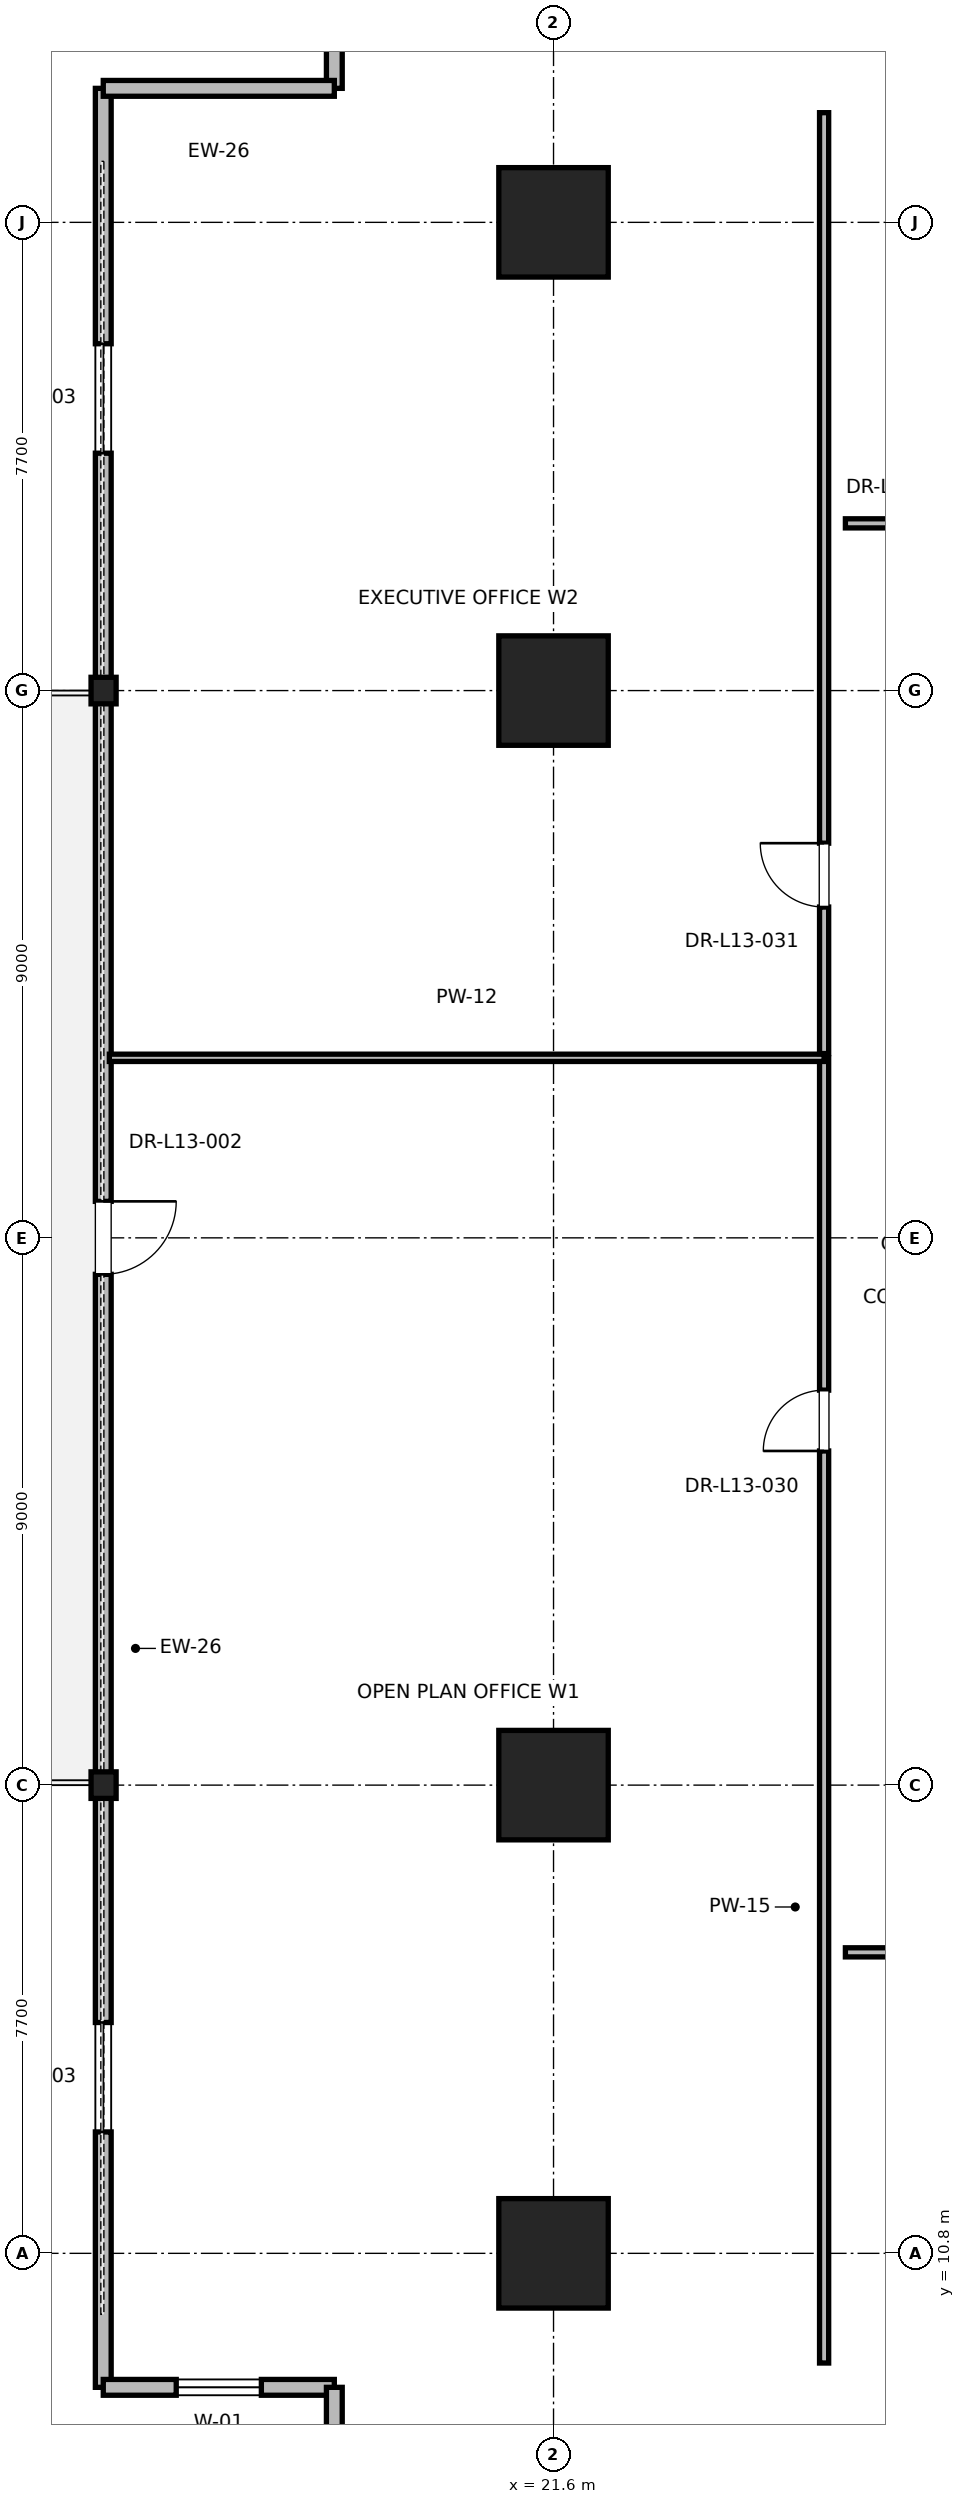
"""IFC4 building model, lengths in metres.
Left out: names, types, materials, properties, quantities, classifications, styles, units other than length and angle.
Written with IfcOpenShell. Run it as: python <this file> out.ifc"""

import sys

from ifc_helpers import new_model, si_unit, direction, frame, frame_2d, origin, origin_2d, place, context, subcontext, project, spatial, rectangle, i_section, extrude, element, fill, save


model = new_model("IFC4")
c1 = context("Model", 3, precision=1e-05, world=origin(), true_north=direction((0.0, 1.0)))
c2 = subcontext(c1, "Body", "Model", "MODEL_VIEW")
j1 = project(units=[si_unit("LENGTHUNIT", "METRE"), si_unit("PLANEANGLEUNIT", "RADIAN")], contexts=[c1])
p1 = place(None, origin())
s1 = spatial("IfcSite", under=j1, at=p1, CompositionType="ELEMENT")
p2 = place(p1, origin())
s2 = spatial("IfcBuilding", under=s1, at=p2, CompositionType="ELEMENT")
p3 = place(p2, frame((0.0, 0.0, 59.6)))
s3 = spatial("IfcBuildingStorey", under=s2, at=p3, CompositionType="ELEMENT", Elevation=59.6)
for number, where, z_axis, x_axis in (
    (1, (21.6, 18.5, 0.0), (0.0, 0.0, 1.0), (1.0, 0.0, 0.0)),
    (2, (21.6, 36.5, 0.0), (0.0, 0.0, 1.0), (1.0, 0.0, 0.0)),
    (3, (21.6, 10.8, 0.0), (0.0, 0.0, 1.0), (1.0, 0.0, 0.0)),
    (4, (21.6, 44.2, 0.0), (0.0, 0.0, 1.0), (1.0, 0.0, 0.0)),
):
    element("IfcColumn", number, at=place(p3, frame(where, z_axis=z_axis, x_axis=x_axis)), inside=s3, PredefinedType="COLUMN", context=c2, shape_type="SweptSolid", body=[
        extrude(rectangle(XDim=1.8, YDim=1.8, at=origin_2d()), origin(), (0.0, 0.0, 1.0), 4.0),
    ])
for number, where, z_axis, x_axis in (
    (5, (14.2, 18.5, 0.0), (0.0, 0.0, 1.0), (1.0, 0.0, 0.0)),
    (6, (14.2, 36.5, 0.0), (0.0, 0.0, 1.0), (1.0, 0.0, 0.0)),
):
    element("IfcColumn", number, at=place(p3, frame(where, z_axis=z_axis, x_axis=x_axis)), inside=s3, PredefinedType="COLUMN", context=c2, shape_type="SweptSolid", body=[
        extrude(i_section(OverallWidth=0.412, OverallDepth=0.437, WebThickness=0.036, FlangeThickness=0.058, FilletRadius=0.015, at=origin_2d()), origin(), (0.0, 0.0, 1.0), 4.0),
    ])
p4 = place(p3, frame((14.195, 46.404, 0.0), z_axis=(0.0, 0.0, 1.0), x_axis=(0.0, -1.0, 0.0)))
e7 = element("IfcWall", 7, at=p4, inside=s3, PredefinedType="PARAPET", context=c2, shape_type="SweptSolid", body=[
    extrude(rectangle(XDim=37.807, YDim=0.26, at=frame_2d((18.904, 0.0))), origin(), (0.0, 0.0, 1.0), 2.889),
])
p5 = place(p4, frame((4.2, 0.0, 0.85)))
e8 = element("IfcOpeningElement", 8, at=p5, cuts=e7, PredefinedType="OPENING", context=c2, shape_type="SweptSolid", body=[
    extrude(rectangle(XDim=1.8, YDim=2.2, at=frame_2d((0.9, 1.1))), frame((0.0, 0.13, 0.0), z_axis=(0.0, -1.0, 0.0), x_axis=(1.0, 0.0, 0.0)), (0.0, 0.0, 1.0), 0.26),
])
p6 = place(p4, frame((18.304, 0.0, 0.0)))
e9 = element("IfcOpeningElement", 9, at=p6, cuts=e7, PredefinedType="OPENING", context=c2, shape_type="SweptSolid", body=[
    extrude(rectangle(XDim=1.2, YDim=2.2, at=frame_2d((0.6, 1.1))), frame((0.0, 0.13, 0.0), z_axis=(0.0, -1.0, 0.0), x_axis=(1.0, 0.0, 0.0)), (0.0, 0.0, 1.0), 0.26),
])
p7 = place(p4, frame((31.807, 0.0, 0.85)))
e10 = element("IfcOpeningElement", 10, at=p7, cuts=e7, PredefinedType="OPENING", context=c2, shape_type="SweptSolid", body=[
    extrude(rectangle(XDim=1.8, YDim=2.2, at=frame_2d((0.9, 1.1))), frame((0.0, 0.13, 0.0), z_axis=(0.0, -1.0, 0.0), x_axis=(1.0, 0.0, 0.0)), (0.0, 0.0, 1.0), 0.26),
])
p8 = place(p3, frame((14.195, 8.596, 0.0), z_axis=(0.0, 0.0, 1.0), x_axis=(1.0, 0.0, 0.0)))
e11 = element("IfcWall", 11, at=p8, inside=s3, PredefinedType="PARAPET", context=c2, shape_type="SweptSolid", body=[
    extrude(rectangle(XDim=3.8, YDim=0.26, at=frame_2d((1.9, 0.0))), origin(), (0.0, 0.0, 1.0), 3.76),
])
p9 = place(p8, frame((1.2, 0.0, 0.85)))
e12 = element("IfcOpeningElement", 12, at=p9, cuts=e11, PredefinedType="OPENING", context=c2, shape_type="SweptSolid", body=[
    extrude(rectangle(XDim=1.4, YDim=2.0, at=frame_2d((0.7, 1.0))), frame((0.0, 0.13, 0.0), z_axis=(0.0, -1.0, 0.0), x_axis=(1.0, 0.0, 0.0)), (0.0, 0.0, 1.0), 0.26),
])
p10 = place(p3, frame((17.995, 8.596, 0.0), z_axis=(0.0, 0.0, 1.0), x_axis=(0.0, -1.0, 0.0)))
e13 = element("IfcWall", 13, at=p10, inside=s3, PredefinedType="PARAPET", context=c2, shape_type="SweptSolid", body=[
    extrude(rectangle(XDim=3.4, YDim=0.26, at=frame_2d((1.7, 0.0))), origin(), (0.0, 0.0, 1.0), 3.76),
])
p11 = place(p3, frame((17.995, 49.804, 0.0), z_axis=(0.0, 0.0, 1.0), x_axis=(0.0, -1.0, 0.0)))
e14 = element("IfcWall", 14, at=p11, inside=s3, PredefinedType="PARAPET", context=c2, shape_type="SweptSolid", body=[
    extrude(rectangle(XDim=3.4, YDim=0.26, at=frame_2d((1.7, 0.0))), origin(), (0.0, 0.0, 1.0), 3.76),
])
p12 = place(p11, frame((1.0, 0.0, 0.85)))
e15 = element("IfcOpeningElement", 15, at=p12, cuts=e14, PredefinedType="OPENING", context=c2, shape_type="SweptSolid", body=[
    extrude(rectangle(XDim=1.4, YDim=2.0, at=frame_2d((0.7, 1.0))), frame((0.0, 0.13, 0.0), z_axis=(0.0, -1.0, 0.0), x_axis=(1.0, 0.0, 0.0)), (0.0, 0.0, 1.0), 0.26),
])
p13 = place(p3, frame((17.995, 46.404, 0.0), z_axis=(0.0, 0.0, 1.0), x_axis=(-1.0, 0.0, 0.0)))
e16 = element("IfcWall", 16, at=p13, inside=s3, PredefinedType="PARAPET", context=c2, shape_type="SweptSolid", body=[
    extrude(rectangle(XDim=3.8, YDim=0.26, at=frame_2d((1.9, 0.0))), origin(), (0.0, 0.0, 1.0), 3.76),
])
p14 = place(p3, frame((26.4, 39.25, 0.0), z_axis=(0.0, 0.0, 1.0), x_axis=(1.0, 0.0, 0.0)))
e17 = element("IfcWall", 17, at=p14, inside=s3, PredefinedType="PARTITIONING", context=c2, shape_type="SweptSolid", body=[
    extrude(rectangle(XDim=5.984, YDim=0.15, at=frame_2d((2.992, 0.0))), origin(), (0.0, 0.0, 1.0), 2.85),
])
p15 = place(p14, frame((2.257, 0.0, 0.0)))
e18 = element("IfcOpeningElement", 18, at=p15, cuts=e17, PredefinedType="OPENING", context=c2, shape_type="SweptSolid", body=[
    extrude(rectangle(XDim=1.5, YDim=2.25, at=frame_2d((0.75, 1.125))), frame((0.0, 0.075, 0.0), z_axis=(0.0, -1.0, 0.0), x_axis=(1.0, 0.0, 0.0)), (0.0, 0.0, 1.0), 0.15),
])
p16 = place(p3, frame((26.4, 15.75, 0.0), z_axis=(0.0, 0.0, 1.0), x_axis=(1.0, 0.0, 0.0)))
e19 = element("IfcWall", 19, at=p16, inside=s3, PredefinedType="PARTITIONING", context=c2, shape_type="SweptSolid", body=[
    extrude(rectangle(XDim=11.424, YDim=0.15, at=frame_2d((5.712, 0.0))), origin(), (0.0, 0.0, 1.0), 2.85),
])
p17 = place(p16, frame((5.227, 0.0, 0.0)))
e20 = element("IfcOpeningElement", 20, at=p17, cuts=e19, PredefinedType="OPENING", context=c2, shape_type="SweptSolid", body=[
    extrude(rectangle(XDim=1.0, YDim=2.15, at=frame_2d((0.5, 1.075))), frame((0.0, 0.075, 0.0), z_axis=(0.0, -1.0, 0.0), x_axis=(1.0, 0.0, 0.0)), (0.0, 0.0, 1.0), 0.15),
])
p18 = place(p3, frame((26.05, 8.996, 0.0), z_axis=(0.0, 0.0, 1.0), x_axis=(0.0, 1.0, 0.0)))
e21 = element("IfcWall", 21, at=p18, inside=s3, PredefinedType="PARTITIONING", context=c2, shape_type="SweptSolid", body=[
    extrude(rectangle(XDim=21.464, YDim=0.15, at=frame_2d((10.732, 0.0))), origin(), (0.0, 0.0, 1.0), 2.85),
])
p19 = place(p18, frame((14.999, 0.0, 0.0)))
e22 = element("IfcOpeningElement", 22, at=p19, cuts=e21, PredefinedType="OPENING", context=c2, shape_type="SweptSolid", body=[
    extrude(rectangle(XDim=1.0, YDim=2.15, at=frame_2d((0.5, 1.075))), frame((0.0, 0.075, 0.0), z_axis=(0.0, -1.0, 0.0), x_axis=(1.0, 0.0, 0.0)), (0.0, 0.0, 1.0), 0.15),
])
p20 = place(p3, frame((14.295, 30.461, 0.0), z_axis=(0.0, 0.0, 1.0), x_axis=(1.0, 0.0, 0.0)))
e23 = element("IfcWall", 23, at=p20, inside=s3, PredefinedType="PARTITIONING", context=c2, shape_type="SweptSolid", body=[
    extrude(rectangle(XDim=11.755, YDim=0.12, at=frame_2d((5.877, 0.0))), origin(), (0.0, 0.0, 1.0), 2.85),
])
p21 = place(p3, frame((26.05, 30.531, 0.0), z_axis=(0.0, 0.0, 1.0), x_axis=(0.0, 1.0, 0.0)))
e24 = element("IfcWall", 24, at=p21, inside=s3, PredefinedType="PARTITIONING", context=c2, shape_type="SweptSolid", body=[
    extrude(rectangle(XDim=15.473, YDim=0.15, at=frame_2d((7.737, 0.0))), origin(), (0.0, 0.0, 1.0), 2.85),
])
p22 = place(p21, frame((2.41, 0.0, 0.0)))
e25 = element("IfcOpeningElement", 25, at=p22, cuts=e24, PredefinedType="OPENING", context=c2, shape_type="SweptSolid", body=[
    extrude(rectangle(XDim=1.05, YDim=2.2, at=frame_2d((0.525, 1.1))), frame((0.0, 0.075, 0.0), z_axis=(0.0, -1.0, 0.0), x_axis=(1.0, 0.0, 0.0)), (0.0, 0.0, 1.0), 0.15),
])
p23 = place(p5, origin())
e26 = element("IfcWindow", 26, at=p23, inside=s3, PartitioningType="SINGLE_PANEL", PredefinedType="WINDOW", context=c2, shape_type="SweptSolid", body=[
    extrude(rectangle(XDim=1.8, YDim=2.2, at=frame_2d((0.9, 1.1))), frame((0.0, 0.03, 0.0), z_axis=(0.0, -1.0, 0.0), x_axis=(1.0, 0.0, 0.0)), (0.0, 0.0, 1.0), 0.06),
])
fill(e8, e26)
p24 = place(p6, origin())
e27 = element("IfcDoor", 27, at=p24, inside=s3, OperationType="SINGLE_SWING_LEFT", PredefinedType="DOOR", context=c2, shape_type="SweptSolid", body=[
    extrude(rectangle(XDim=1.2, YDim=2.2, at=frame_2d((0.6, 1.1))), frame((0.0, 0.025, 0.0), z_axis=(0.0, -1.0, 0.0), x_axis=(1.0, 0.0, 0.0)), (0.0, 0.0, 1.0), 0.05),
])
fill(e9, e27)
p25 = place(p7, origin())
e28 = element("IfcWindow", 28, at=p25, inside=s3, PartitioningType="SINGLE_PANEL", PredefinedType="WINDOW", context=c2, shape_type="SweptSolid", body=[
    extrude(rectangle(XDim=1.8, YDim=2.2, at=frame_2d((0.9, 1.1))), frame((0.0, 0.03, 0.0), z_axis=(0.0, -1.0, 0.0), x_axis=(1.0, 0.0, 0.0)), (0.0, 0.0, 1.0), 0.06),
])
fill(e10, e28)
p26 = place(p9, origin())
e29 = element("IfcWindow", 29, at=p26, inside=s3, PartitioningType="SINGLE_PANEL", PredefinedType="WINDOW", context=c2, shape_type="SweptSolid", body=[
    extrude(rectangle(XDim=1.4, YDim=2.0, at=frame_2d((0.7, 1.0))), frame((0.0, 0.03, 0.0), z_axis=(0.0, -1.0, 0.0), x_axis=(1.0, 0.0, 0.0)), (0.0, 0.0, 1.0), 0.06),
])
fill(e12, e29)
p27 = place(p19, origin())
e30 = element("IfcDoor", 30, at=p27, inside=s3, OperationType="SINGLE_SWING_LEFT", PredefinedType="DOOR", context=c2, shape_type="SweptSolid", body=[
    extrude(rectangle(XDim=1.0, YDim=2.15, at=frame_2d((0.5, 1.075))), frame((0.0, 0.025, 0.0), z_axis=(0.0, -1.0, 0.0), x_axis=(1.0, 0.0, 0.0)), (0.0, 0.0, 1.0), 0.05),
])
fill(e22, e30)
p28 = place(p22, origin())
e31 = element("IfcDoor", 31, at=p28, inside=s3, OperationType="SINGLE_SWING_RIGHT", PredefinedType="DOOR", context=c2, shape_type="SweptSolid", body=[
    extrude(rectangle(XDim=1.05, YDim=2.2, at=frame_2d((0.525, 1.1))), frame((0.0, 0.025, 0.0), z_axis=(0.0, -1.0, 0.0), x_axis=(1.0, 0.0, 0.0)), (0.0, 0.0, 1.0), 0.05),
])
fill(e25, e31)
save(model, sys.argv[1])
